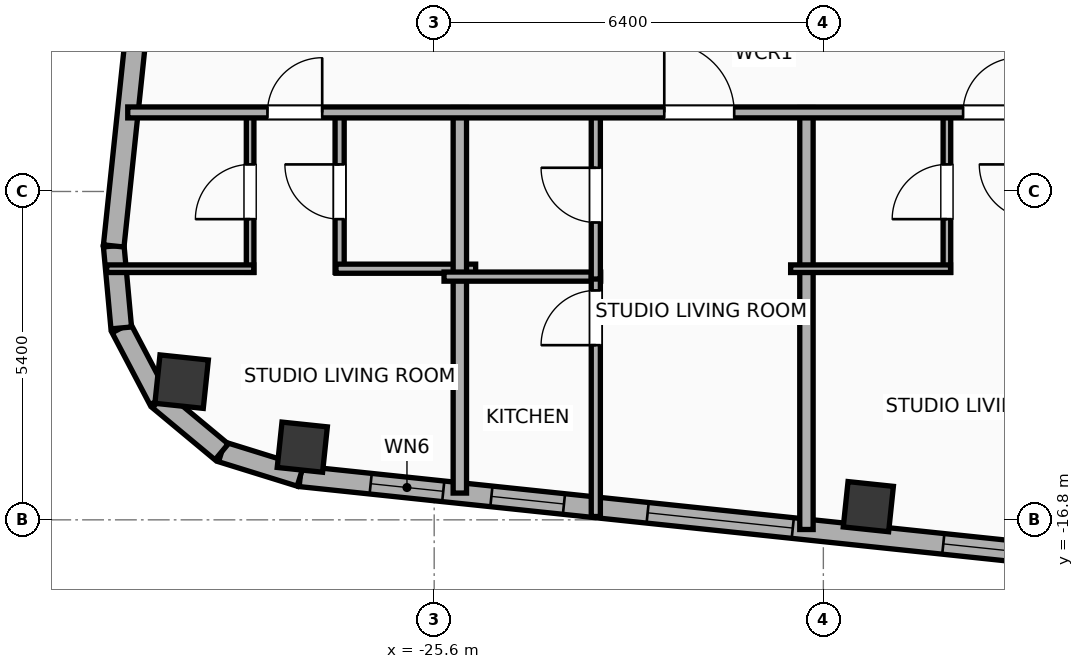
"""IFC4 building model, lengths in metres.
Left out: names, types, materials, properties, quantities, classifications, styles, units other than length and angle.
Written with IfcOpenShell. Run it as: python <this file> out.ifc"""

import sys

from ifc_helpers import new_model, si_unit, direction, frame, frame_2d, origin, origin_2d, place, context, subcontext, project, spatial, rectangle, hollow_rectangle, hollow_circle, extrude, element, fill, save


model = new_model("IFC4")
c1 = context("Model", 3, precision=1e-05, world=origin(), true_north=direction((0.0, 1.0)))
c2 = subcontext(c1, "Body", "Model", "MODEL_VIEW")
j1 = project(units=[si_unit("LENGTHUNIT", "METRE"), si_unit("PLANEANGLEUNIT", "RADIAN")], contexts=[c1])
p1 = place(None, origin())
s1 = spatial("IfcSite", under=j1, at=p1, CompositionType="ELEMENT")
p2 = place(p1, origin())
s2 = spatial("IfcBuilding", under=s1, at=p2, CompositionType="ELEMENT")
p3 = place(p2, frame((0.0, 0.0, 260.0)))
s3 = spatial("IfcBuildingStorey", under=s2, at=p3, CompositionType="ELEMENT", Elevation=260.0)
for number, where, z_axis, x_axis in (
    (1, (-27.769, -15.604, 0.0), (0.0, 0.0, 1.0), (0.995, -0.105, 0.0)),
    (2, (-18.46, -16.583, 0.0), (0.0, 0.0, 1.0), (0.995, -0.105, 0.0)),
):
    element("IfcColumn", number, at=place(p3, frame(where, z_axis=z_axis, x_axis=x_axis)), inside=s3, PredefinedType="COLUMN", context=c2, shape_type="SweptSolid", body=[
        extrude(hollow_rectangle(XDim=0.75, YDim=0.75, WallThickness=0.025, at=origin_2d()), origin(), (0.0, 0.0, 1.0), 3.9),
    ])
p4 = place(p3, frame((-29.753, -14.527, 0.0), z_axis=(0.0, 0.0, 1.0), x_axis=(0.994521895368, -0.104528463268, 0.0)))
e3 = element("IfcColumn", 3, at=p4, inside=s3, PredefinedType="COLUMN", context=c2, shape_type="SweptSolid", body=[
    extrude(hollow_circle(Radius=0.4, WallThickness=0.028, at=origin_2d()), origin(), (0.0, 0.0, 1.0), 3.9),
])
p5 = place(p3, frame((18.708, -20.972, 0.0), z_axis=(0.0, 0.0, 1.0), x_axis=(-0.994521888554, 0.104528528102, 0.0)))
e4 = element("IfcWall", 4, at=p5, inside=s3, PredefinedType="ELEMENTEDWALL", context=c2, shape_type="SweptSolid", body=[
    extrude(rectangle(XDim=46.766, YDim=0.34, at=frame_2d((23.383, 0.0))), origin(), (0.0, 0.0, 1.0), 2.54),
])
p6 = place(p5, frame((23.833, 0.0, 0.75)))
e5 = element("IfcOpeningElement", 5, at=p6, cuts=e4, PredefinedType="OPENING", context=c2, shape_type="SweptSolid", body=[
    extrude(rectangle(XDim=2.4, YDim=1.63, at=frame_2d((1.2, 0.815))), frame((0.0, 0.18, 0.0), z_axis=(0.0, -1.0, 0.0), x_axis=(1.0, 0.0, 0.0)), (0.0, 0.0, 1.0), 0.36),
])
p7 = place(p5, frame((38.622, 0.0, 0.75)))
e6 = element("IfcOpeningElement", 6, at=p7, cuts=e4, PredefinedType="OPENING", context=c2, shape_type="SweptSolid", body=[
    extrude(rectangle(XDim=2.4, YDim=1.63, at=frame_2d((1.2, 0.815))), frame((0.0, 0.18, 0.0), z_axis=(0.0, -1.0, 0.0), x_axis=(1.0, 0.0, 0.0)), (0.0, 0.0, 1.0), 0.36),
])
p8 = place(p5, frame((44.402, 0.0, 0.75)))
e7 = element("IfcOpeningElement", 7, at=p8, cuts=e4, PredefinedType="OPENING", context=c2, shape_type="SweptSolid", body=[
    extrude(rectangle(XDim=1.2, YDim=1.63, at=frame_2d((0.6, 0.815))), frame((0.0, 0.18, 0.0), z_axis=(0.0, -1.0, 0.0), x_axis=(1.0, 0.0, 0.0)), (0.0, 0.0, 1.0), 0.36),
])
p9 = place(p5, frame((42.406, 0.0, 0.75)))
e8 = element("IfcOpeningElement", 8, at=p9, cuts=e4, PredefinedType="OPENING", context=c2, shape_type="SweptSolid", body=[
    extrude(rectangle(XDim=1.2, YDim=1.63, at=frame_2d((0.6, 0.815))), frame((0.0, 0.18, 0.0), z_axis=(0.0, -1.0, 0.0), x_axis=(1.0, 0.0, 0.0)), (0.0, 0.0, 1.0), 0.36),
])
p10 = place(p5, frame((34.933, 0.0, 0.75)))
e9 = element("IfcOpeningElement", 9, at=p10, cuts=e4, PredefinedType="OPENING", context=c2, shape_type="SweptSolid", body=[
    extrude(rectangle(XDim=1.2, YDim=1.63, at=frame_2d((0.6, 0.815))), frame((0.0, 0.18, 0.0), z_axis=(0.0, -1.0, 0.0), x_axis=(1.0, 0.0, 0.0)), (0.0, 0.0, 1.0), 0.36),
])
p11 = place(p5, frame((28.631, 0.0, 0.75)))
e10 = element("IfcOpeningElement", 10, at=p11, cuts=e4, PredefinedType="OPENING", context=c2, shape_type="SweptSolid", body=[
    extrude(rectangle(XDim=1.2, YDim=1.63, at=frame_2d((0.6, 0.815))), frame((0.0, 0.18, 0.0), z_axis=(0.0, -1.0, 0.0), x_axis=(1.0, 0.0, 0.0)), (0.0, 0.0, 1.0), 0.36),
])
p12 = place(p5, frame((30.896, 0.0, 0.75)))
e11 = element("IfcOpeningElement", 11, at=p12, cuts=e4, PredefinedType="OPENING", context=c2, shape_type="SweptSolid", body=[
    extrude(rectangle(XDim=1.2, YDim=1.63, at=frame_2d((0.6, 0.815))), frame((0.0, 0.18, 0.0), z_axis=(0.0, -1.0, 0.0), x_axis=(1.0, 0.0, 0.0)), (0.0, 0.0, 1.0), 0.36),
])
p13 = place(p5, frame((7.492, 0.0, 0.75)))
e12 = element("IfcOpeningElement", 12, at=p13, cuts=e4, PredefinedType="OPENING", context=c2, shape_type="SweptSolid", body=[
    extrude(rectangle(XDim=1.2, YDim=1.63, at=frame_2d((0.6, 0.815))), frame((0.0, 0.18, 0.0), z_axis=(0.0, -1.0, 0.0), x_axis=(1.0, 0.0, 0.0)), (0.0, 0.0, 1.0), 0.36),
])
p14 = place(p5, frame((4.141, 0.0, 0.75)))
e13 = element("IfcOpeningElement", 13, at=p14, cuts=e4, PredefinedType="OPENING", context=c2, shape_type="SweptSolid", body=[
    extrude(rectangle(XDim=1.2, YDim=1.63, at=frame_2d((0.6, 0.815))), frame((0.0, 0.18, 0.0), z_axis=(0.0, -1.0, 0.0), x_axis=(1.0, 0.0, 0.0)), (0.0, 0.0, 1.0), 0.36),
])
p15 = place(p5, frame((1.36, 0.0, 0.75)))
e14 = element("IfcOpeningElement", 14, at=p15, cuts=e4, PredefinedType="OPENING", context=c2, shape_type="SweptSolid", body=[
    extrude(rectangle(XDim=1.2, YDim=1.63, at=frame_2d((0.6, 0.815))), frame((0.0, 0.18, 0.0), z_axis=(0.0, -1.0, 0.0), x_axis=(1.0, 0.0, 0.0)), (0.0, 0.0, 1.0), 0.36),
])
p16 = place(p5, frame((20.254, 0.0, 0.75)))
e15 = element("IfcOpeningElement", 15, at=p16, cuts=e4, PredefinedType="OPENING", context=c2, shape_type="SweptSolid", body=[
    extrude(rectangle(XDim=1.2, YDim=1.63, at=frame_2d((0.6, 0.815))), frame((0.0, 0.18, 0.0), z_axis=(0.0, -1.0, 0.0), x_axis=(1.0, 0.0, 0.0)), (0.0, 0.0, 1.0), 0.36),
])
p17 = place(p5, frame((16.172, 0.0, 0.75)))
e16 = element("IfcOpeningElement", 16, at=p17, cuts=e4, PredefinedType="OPENING", context=c2, shape_type="SweptSolid", body=[
    extrude(rectangle(XDim=1.2, YDim=1.63, at=frame_2d((0.6, 0.815))), frame((0.0, 0.18, 0.0), z_axis=(0.0, -1.0, 0.0), x_axis=(1.0, 0.0, 0.0)), (0.0, 0.0, 1.0), 0.36),
])
p18 = place(p5, frame((12.11, 0.0, 0.75)))
e17 = element("IfcOpeningElement", 17, at=p18, cuts=e4, PredefinedType="OPENING", context=c2, shape_type="SweptSolid", body=[
    extrude(rectangle(XDim=1.2, YDim=1.63, at=frame_2d((0.6, 0.815))), frame((0.0, 0.18, 0.0), z_axis=(0.0, -1.0, 0.0), x_axis=(1.0, 0.0, 0.0)), (0.0, 0.0, 1.0), 0.36),
])
p19 = place(p3, frame((-27.802, -16.084, 0.0), z_axis=(0.0, 0.0, 1.0), x_axis=(-0.955007802701, 0.296580674994, 0.0)))
e18 = element("IfcWall", 18, at=p19, inside=s3, PredefinedType="ELEMENTEDWALL", context=c2, shape_type="SweptSolid", body=[
    extrude(rectangle(XDim=1.354, YDim=0.34, at=frame_2d((0.677, 0.0))), origin(), (0.0, 0.0, 1.0), 2.54),
])
p20 = place(p3, frame((-29.096, -15.682, 0.0), z_axis=(0.0, 0.0, 1.0), x_axis=(-0.768864427906, 0.639411832469, 0.0)))
e19 = element("IfcWall", 19, at=p20, inside=s3, PredefinedType="ELEMENTEDWALL", context=c2, shape_type="SweptSolid", body=[
    extrude(rectangle(XDim=1.337, YDim=0.34, at=frame_2d((0.668, 0.0))), origin(), (0.0, 0.0, 1.0), 2.54),
])
p21 = place(p3, frame((-30.124, -14.827, 0.0), z_axis=(0.0, 0.0, 1.0), x_axis=(-0.465528132217, 0.885033083062, 0.0)))
e20 = element("IfcWall", 20, at=p21, inside=s3, PredefinedType="ELEMENTEDWALL", context=c2, shape_type="SweptSolid", body=[
    extrude(rectangle(XDim=1.337, YDim=0.34, at=frame_2d((0.668, 0.0))), origin(), (0.0, 0.0, 1.0), 3.65),
])
p22 = place(p3, frame((-30.746, -13.644, 0.0), z_axis=(0.0, 0.0, 1.0), x_axis=(-0.091592370975, 0.995796584438, 0.0)))
e21 = element("IfcWall", 21, at=p22, inside=s3, PredefinedType="ELEMENTEDWALL", context=c2, shape_type="SweptSolid", body=[
    extrude(rectangle(XDim=1.354, YDim=0.34, at=frame_2d((0.677, 0.0))), origin(), (0.0, 0.0, 1.0), 3.65),
])
p23 = place(p3, frame((-30.87, -12.296, 0.0), z_axis=(0.0, 0.0, 1.0), x_axis=(0.104533282919, 0.994521388791, 0.0)))
e22 = element("IfcWall", 22, at=p23, inside=s3, PredefinedType="ELEMENTEDWALL", context=c2, shape_type="SweptSolid", body=[
    extrude(rectangle(XDim=30.366, YDim=0.34, at=frame_2d((15.183, 0.0))), origin(), (0.0, 0.0, 1.0), 2.54),
])
p24 = place(p23, frame((5.842, 0.0, 0.75)))
e23 = element("IfcOpeningElement", 23, at=p24, cuts=e22, PredefinedType="OPENING", context=c2, shape_type="SweptSolid", body=[
    extrude(rectangle(XDim=1.8, YDim=1.63, at=frame_2d((0.9, 0.815))), frame((0.0, 0.18, 0.0), z_axis=(0.0, -1.0, 0.0), x_axis=(1.0, 0.0, 0.0)), (0.0, 0.0, 1.0), 0.36),
])
p25 = place(p23, frame((23.525, 0.0, 0.75)))
e24 = element("IfcOpeningElement", 24, at=p25, cuts=e22, PredefinedType="OPENING", context=c2, shape_type="SweptSolid", body=[
    extrude(rectangle(XDim=1.8, YDim=1.63, at=frame_2d((0.9, 0.815))), frame((0.0, 0.18, 0.0), z_axis=(0.0, -1.0, 0.0), x_axis=(1.0, 0.0, 0.0)), (0.0, 0.0, 1.0), 0.36),
])
p26 = place(p23, frame((27.017, 0.0, 0.75)))
e25 = element("IfcOpeningElement", 25, at=p26, cuts=e22, PredefinedType="OPENING", context=c2, shape_type="SweptSolid", body=[
    extrude(rectangle(XDim=1.2, YDim=1.63, at=frame_2d((0.6, 0.815))), frame((0.0, 0.18, 0.0), z_axis=(0.0, -1.0, 0.0), x_axis=(1.0, 0.0, 0.0)), (0.0, 0.0, 1.0), 0.36),
])
p27 = place(p23, frame((16.135, 0.0, 0.75)))
e26 = element("IfcOpeningElement", 26, at=p27, cuts=e22, PredefinedType="OPENING", context=c2, shape_type="SweptSolid", body=[
    extrude(rectangle(XDim=1.2, YDim=1.63, at=frame_2d((0.6, 0.815))), frame((0.0, 0.18, 0.0), z_axis=(0.0, -1.0, 0.0), x_axis=(1.0, 0.0, 0.0)), (0.0, 0.0, 1.0), 0.36),
])
p28 = place(p3, frame((-28.627, -12.73, 0.0), z_axis=(0.0, 0.0, 1.0), x_axis=(0.0, 1.0, 0.0)))
e27 = element("IfcWall", 27, at=p28, inside=s3, PredefinedType="PARTITIONING", context=c2, shape_type="SweptSolid", body=[
    extrude(rectangle(XDim=2.65, YDim=0.125, at=frame_2d((1.325, 0.0))), origin(), (0.0, 0.0, 1.0), 3.65),
])
p29 = place(p28, frame((0.875, 0.0, 0.0)))
e28 = element("IfcOpeningElement", 28, at=p29, cuts=e27, PredefinedType="OPENING", context=c2, shape_type="SweptSolid", body=[
    extrude(rectangle(XDim=0.9, YDim=2.05, at=frame_2d((0.45, 1.025))), frame((0.0, 0.073, 0.0), z_axis=(0.0, -1.0, 0.0), x_axis=(1.0, 0.0, 0.0)), (0.0, 0.0, 1.0), 0.145),
])
p30 = place(p3, frame((-27.155, -12.73, 0.0), z_axis=(0.0, 0.0, 1.0), x_axis=(0.0, 1.0, 0.0)))
e29 = element("IfcWall", 29, at=p30, inside=s3, PredefinedType="PLUMBINGWALL", context=c2, shape_type="SweptSolid", body=[
    extrude(rectangle(XDim=2.65, YDim=0.15, at=frame_2d((1.325, 0.0))), origin(), (0.0, 0.0, 1.0), 3.65),
])
p31 = place(p30, frame((0.875, 0.0, 0.0)))
e30 = element("IfcOpeningElement", 30, at=p31, cuts=e29, PredefinedType="OPENING", context=c2, shape_type="SweptSolid", body=[
    extrude(rectangle(XDim=0.9, YDim=2.05, at=frame_2d((0.45, 1.025))), frame((0.0, 0.085, 0.0), z_axis=(0.0, -1.0, 0.0), x_axis=(1.0, 0.0, 0.0)), (0.0, 0.0, 1.0), 0.17),
])
p32 = place(p3, frame((-30.986, -12.67, 0.0), z_axis=(0.0, 0.0, 1.0), x_axis=(1.0, 0.0, 0.0)))
e31 = element("IfcWall", 31, at=p32, inside=s3, PredefinedType="PARTITIONING", context=c2, shape_type="SweptSolid", body=[
    extrude(rectangle(XDim=2.419, YDim=0.125, at=frame_2d((1.21, 0.0))), origin(), (0.0, 0.0, 1.0), 3.65),
])
p33 = place(p3, frame((-27.215, -12.67, 0.0), z_axis=(0.0, 0.0, 1.0), x_axis=(1.0, 0.0, 0.0)))
e32 = element("IfcWall", 32, at=p33, inside=s3, PredefinedType="PLUMBINGWALL", context=c2, shape_type="SweptSolid", body=[
    extrude(rectangle(XDim=2.297, YDim=0.15, at=frame_2d((1.148, 0.0))), origin(), (0.0, 0.0, 1.0), 3.65),
])
p34 = place(p3, frame((-25.178, -16.36, 0.0), z_axis=(0.0, 0.0, 1.0), x_axis=(0.0, 1.0, 0.0)))
e33 = element("IfcWall", 33, at=p34, inside=s3, PredefinedType="PARTITIONING", context=c2, shape_type="SweptSolid", body=[
    extrude(rectangle(XDim=6.34, YDim=0.22, at=frame_2d((3.17, 0.0))), origin(), (0.0, 0.0, 1.0), 3.65),
])
p35 = place(p3, frame((-25.438, -12.8, 0.0), z_axis=(0.0, 0.0, 1.0), x_axis=(1.0, 0.0, 0.0)))
e34 = element("IfcWall", 34, at=p35, inside=s3, PredefinedType="PLUMBINGWALL", context=c2, shape_type="SweptSolid", body=[
    extrude(rectangle(XDim=2.576, YDim=0.15, at=frame_2d((1.288, 0.0))), origin(), (0.0, 0.0, 1.0), 3.65),
])
p36 = place(p3, frame((-22.942, -16.745, 0.0), z_axis=(0.0, 0.0, 1.0), x_axis=(0.0, 1.0, 0.0)))
e35 = element("IfcWall", 35, at=p36, inside=s3, PredefinedType="PLUMBINGWALL", context=c2, shape_type="SweptSolid", body=[
    extrude(rectangle(XDim=3.985, YDim=0.15, at=frame_2d((1.993, 0.0))), origin(), (0.0, 0.0, 1.0), 3.65),
])
p37 = place(p36, frame((2.818, 0.0, 0.0)))
e36 = element("IfcOpeningElement", 36, at=p37, cuts=e35, PredefinedType="OPENING", context=c2, shape_type="SweptSolid", body=[
    extrude(rectangle(XDim=0.9, YDim=2.05, at=frame_2d((0.45, 1.025))), frame((0.0, 0.085, 0.0), z_axis=(0.0, -1.0, 0.0), x_axis=(1.0, 0.0, 0.0)), (0.0, 0.0, 1.0), 0.17),
])
p38 = place(p3, frame((-22.942, -12.84, 0.0), z_axis=(0.0, 0.0, 1.0), x_axis=(0.0, 1.0, 0.0)))
e37 = element("IfcWall", 37, at=p38, inside=s3, PredefinedType="PLUMBINGWALL", context=c2, shape_type="SweptSolid", body=[
    extrude(rectangle(XDim=2.76, YDim=0.15, at=frame_2d((1.38, 0.0))), origin(), (0.0, 0.0, 1.0), 3.65),
])
p39 = place(p38, frame((0.93, 0.0, 0.0)))
e38 = element("IfcOpeningElement", 38, at=p39, cuts=e37, PredefinedType="OPENING", context=c2, shape_type="SweptSolid", body=[
    extrude(rectangle(XDim=0.9, YDim=2.05, at=frame_2d((0.45, 1.025))), frame((0.0, 0.085, 0.0), z_axis=(0.0, -1.0, 0.0), x_axis=(1.0, 0.0, 0.0)), (0.0, 0.0, 1.0), 0.17),
])
p40 = place(p3, frame((-19.478, -16.959, 0.0), z_axis=(0.0, 0.0, 1.0), x_axis=(0.0, 1.0, 0.0)))
e39 = element("IfcWall", 39, at=p40, inside=s3, PredefinedType="PARTITIONING", context=c2, shape_type="SweptSolid", body=[
    extrude(rectangle(XDim=6.939, YDim=0.22, at=frame_2d((3.469, 0.0))), origin(), (0.0, 0.0, 1.0), 2.54),
])
p41 = place(p3, frame((-17.168, -12.73, 0.0), z_axis=(0.0, 0.0, 1.0), x_axis=(0.0, 1.0, 0.0)))
e40 = element("IfcWall", 40, at=p41, inside=s3, PredefinedType="PARTITIONING", context=c2, shape_type="SweptSolid", body=[
    extrude(rectangle(XDim=2.65, YDim=0.125, at=frame_2d((1.325, 0.0))), origin(), (0.0, 0.0, 1.0), 3.65),
])
p42 = place(p41, frame((0.875, 0.0, 0.0)))
e41 = element("IfcOpeningElement", 41, at=p42, cuts=e40, PredefinedType="OPENING", context=c2, shape_type="SweptSolid", body=[
    extrude(rectangle(XDim=0.9, YDim=2.05, at=frame_2d((0.45, 1.025))), frame((0.0, 0.073, 0.0), z_axis=(0.0, -1.0, 0.0), x_axis=(1.0, 0.0, 0.0)), (0.0, 0.0, 1.0), 0.145),
])
p43 = place(p3, frame((-19.738, -12.67, 0.0), z_axis=(0.0, 0.0, 1.0), x_axis=(1.0, 0.0, 0.0)))
e42 = element("IfcWall", 42, at=p43, inside=s3, PredefinedType="PARTITIONING", context=c2, shape_type="SweptSolid", body=[
    extrude(rectangle(XDim=2.63, YDim=0.125, at=frame_2d((1.315, 0.0))), origin(), (0.0, 0.0, 1.0), 3.65),
])
p44 = place(p3, frame((-30.639, -10.1, 0.0), z_axis=(0.0, 0.0, 1.0), x_axis=(1.0, 0.0, 0.0)))
e43 = element("IfcWall", 43, at=p44, inside=s3, PredefinedType="PARTITIONING", context=c2, shape_type="SweptSolid", body=[
    extrude(rectangle(XDim=22.559, YDim=0.18, at=frame_2d((11.28, 0.0))), origin(), (0.0, 0.0, 1.0), 3.65),
])
p45 = place(p44, frame((2.298, 0.0, 0.0)))
e44 = element("IfcOpeningElement", 44, at=p45, cuts=e43, PredefinedType="OPENING", context=c2, shape_type="SweptSolid", body=[
    extrude(rectangle(XDim=0.9, YDim=2.05, at=frame_2d((0.45, 1.025))), frame((0.0, 0.1, 0.0), z_axis=(0.0, -1.0, 0.0), x_axis=(1.0, 0.0, 0.0)), (0.0, 0.0, 1.0), 0.2),
])
p46 = place(p44, frame((8.823, 0.0, 0.0)))
e45 = element("IfcOpeningElement", 45, at=p46, cuts=e43, PredefinedType="OPENING", context=c2, shape_type="SweptSolid", body=[
    extrude(rectangle(XDim=1.15, YDim=2.05, at=frame_2d((0.575, 1.025))), frame((0.0, 0.1, 0.0), z_axis=(0.0, -1.0, 0.0), x_axis=(1.0, 0.0, 0.0)), (0.0, 0.0, 1.0), 0.2),
])
p47 = place(p44, frame((13.738, 0.0, 0.0)))
e46 = element("IfcOpeningElement", 46, at=p47, cuts=e43, PredefinedType="OPENING", context=c2, shape_type="SweptSolid", body=[
    extrude(rectangle(XDim=0.9, YDim=2.05, at=frame_2d((0.45, 1.025))), frame((0.0, 0.1, 0.0), z_axis=(0.0, -1.0, 0.0), x_axis=(1.0, 0.0, 0.0)), (0.0, 0.0, 1.0), 0.2),
])
p48 = place(p44, frame((20.27, 0.0, 0.0)))
e47 = element("IfcOpeningElement", 47, at=p48, cuts=e43, PredefinedType="OPENING", context=c2, shape_type="SweptSolid", body=[
    extrude(rectangle(XDim=1.15, YDim=2.05, at=frame_2d((0.575, 1.025))), frame((0.0, 0.1, 0.0), z_axis=(0.0, -1.0, 0.0), x_axis=(1.0, 0.0, 0.0)), (0.0, 0.0, 1.0), 0.2),
])
p49 = place(p7, origin())
e48 = element("IfcWindow", 48, at=p49, inside=s3, PartitioningType="SINGLE_PANEL", PredefinedType="WINDOW", context=c2, shape_type="SweptSolid", body=[
    extrude(rectangle(XDim=2.4, YDim=1.63, at=frame_2d((1.2, 0.815))), frame((0.0, 0.03, 0.0), z_axis=(0.0, -1.0, 0.0), x_axis=(1.0, 0.0, 0.0)), (0.0, 0.0, 1.0), 0.06),
])
fill(e6, e48)
p50 = place(p8, origin())
e49 = element("IfcWindow", 49, at=p50, inside=s3, PartitioningType="SINGLE_PANEL", PredefinedType="WINDOW", context=c2, shape_type="SweptSolid", body=[
    extrude(rectangle(XDim=1.2, YDim=1.63, at=frame_2d((0.6, 0.815))), frame((0.0, 0.03, 0.0), z_axis=(0.0, -1.0, 0.0), x_axis=(1.0, 0.0, 0.0)), (0.0, 0.0, 1.0), 0.06),
])
fill(e7, e49)
p51 = place(p9, origin())
e50 = element("IfcWindow", 50, at=p51, inside=s3, PartitioningType="SINGLE_PANEL", PredefinedType="WINDOW", context=c2, shape_type="SweptSolid", body=[
    extrude(rectangle(XDim=1.2, YDim=1.63, at=frame_2d((0.6, 0.815))), frame((0.0, 0.03, 0.0), z_axis=(0.0, -1.0, 0.0), x_axis=(1.0, 0.0, 0.0)), (0.0, 0.0, 1.0), 0.06),
])
fill(e8, e50)
p52 = place(p10, origin())
e51 = element("IfcWindow", 51, at=p52, inside=s3, PartitioningType="SINGLE_PANEL", PredefinedType="WINDOW", context=c2, shape_type="SweptSolid", body=[
    extrude(rectangle(XDim=1.2, YDim=1.63, at=frame_2d((0.6, 0.815))), frame((0.0, 0.03, 0.0), z_axis=(0.0, -1.0, 0.0), x_axis=(1.0, 0.0, 0.0)), (0.0, 0.0, 1.0), 0.06),
])
fill(e9, e51)
p53 = place(p29, origin())
e52 = element("IfcDoor", 52, at=p53, inside=s3, OperationType="SINGLE_SWING_LEFT", PredefinedType="DOOR", context=c2, shape_type="SweptSolid", body=[
    extrude(rectangle(XDim=0.9, YDim=2.05, at=frame_2d((0.45, 1.025))), frame((0.0, 0.025, 0.0), z_axis=(0.0, -1.0, 0.0), x_axis=(1.0, 0.0, 0.0)), (0.0, 0.0, 1.0), 0.05),
])
fill(e28, e52)
p54 = place(p31, origin())
e53 = element("IfcDoor", 53, at=p54, inside=s3, OperationType="SINGLE_SWING_RIGHT", PredefinedType="DOOR", context=c2, shape_type="SweptSolid", body=[
    extrude(rectangle(XDim=0.9, YDim=2.05, at=frame_2d((0.45, 1.025))), frame((0.0, 0.025, 0.0), z_axis=(0.0, -1.0, 0.0), x_axis=(1.0, 0.0, 0.0)), (0.0, 0.0, 1.0), 0.05),
])
fill(e30, e53)
p55 = place(p37, origin())
e54 = element("IfcDoor", 54, at=p55, inside=s3, OperationType="SINGLE_SWING_LEFT", PredefinedType="DOOR", context=c2, shape_type="SweptSolid", body=[
    extrude(rectangle(XDim=0.9, YDim=2.05, at=frame_2d((0.45, 1.025))), frame((0.0, 0.025, 0.0), z_axis=(0.0, -1.0, 0.0), x_axis=(1.0, 0.0, 0.0)), (0.0, 0.0, 1.0), 0.05),
])
fill(e36, e54)
p56 = place(p39, origin())
e55 = element("IfcDoor", 55, at=p56, inside=s3, OperationType="SINGLE_SWING_RIGHT", PredefinedType="DOOR", context=c2, shape_type="SweptSolid", body=[
    extrude(rectangle(XDim=0.9, YDim=2.05, at=frame_2d((0.45, 1.025))), frame((0.0, 0.025, 0.0), z_axis=(0.0, -1.0, 0.0), x_axis=(1.0, 0.0, 0.0)), (0.0, 0.0, 1.0), 0.05),
])
fill(e38, e55)
p57 = place(p42, origin())
e56 = element("IfcDoor", 56, at=p57, inside=s3, OperationType="SINGLE_SWING_LEFT", PredefinedType="DOOR", context=c2, shape_type="SweptSolid", body=[
    extrude(rectangle(XDim=0.9, YDim=2.05, at=frame_2d((0.45, 1.025))), frame((0.0, 0.025, 0.0), z_axis=(0.0, -1.0, 0.0), x_axis=(1.0, 0.0, 0.0)), (0.0, 0.0, 1.0), 0.05),
])
fill(e41, e56)
p58 = place(p45, origin())
e57 = element("IfcDoor", 57, at=p58, inside=s3, OperationType="SINGLE_SWING_RIGHT", PredefinedType="DOOR", context=c2, shape_type="SweptSolid", body=[
    extrude(rectangle(XDim=0.9, YDim=2.05, at=frame_2d((0.45, 1.025))), frame((0.0, 0.025, 0.0), z_axis=(0.0, -1.0, 0.0), x_axis=(1.0, 0.0, 0.0)), (0.0, 0.0, 1.0), 0.05),
])
fill(e44, e57)
p59 = place(p46, origin())
e58 = element("IfcDoor", 58, at=p59, inside=s3, OperationType="SINGLE_SWING_LEFT", PredefinedType="DOOR", context=c2, shape_type="SweptSolid", body=[
    extrude(rectangle(XDim=1.15, YDim=2.05, at=frame_2d((0.575, 1.025))), frame((0.0, 0.025, 0.0), z_axis=(0.0, -1.0, 0.0), x_axis=(1.0, 0.0, 0.0)), (0.0, 0.0, 1.0), 0.05),
])
fill(e45, e58)
p60 = place(p47, origin())
e59 = element("IfcDoor", 59, at=p60, inside=s3, OperationType="SINGLE_SWING_RIGHT", PredefinedType="DOOR", context=c2, shape_type="SweptSolid", body=[
    extrude(rectangle(XDim=0.9, YDim=2.05, at=frame_2d((0.45, 1.025))), frame((0.0, 0.025, 0.0), z_axis=(0.0, -1.0, 0.0), x_axis=(1.0, 0.0, 0.0)), (0.0, 0.0, 1.0), 0.05),
])
fill(e46, e59)
save(model, sys.argv[1])
